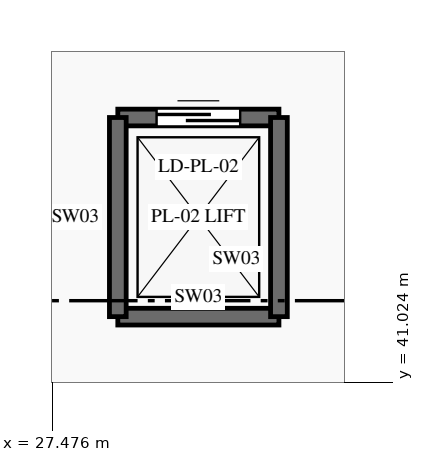
"""IFC4 building model, lengths in metres.
Left out: names, types, materials, properties, quantities, classifications, styles, units other than length and angle.
Written with IfcOpenShell. Run it as: python <this file> out.ifc"""

import sys

from ifc_helpers import new_model, si_unit, direction, frame, frame_2d, origin, place, context, subcontext, project, spatial, rectangle, extrude, element, fill, save


model = new_model("IFC4")
c1 = context("Model", 3, precision=1e-05, world=origin(), true_north=direction((0.0, 1.0)))
c2 = subcontext(c1, "Body", "Model", "MODEL_VIEW")
j1 = project(units=[si_unit("LENGTHUNIT", "METRE"), si_unit("PLANEANGLEUNIT", "RADIAN")], contexts=[c1])
p1 = place(None, origin())
s1 = spatial("IfcSite", under=j1, at=p1, CompositionType="ELEMENT")
p2 = place(p1, origin())
s2 = spatial("IfcBuilding", under=s1, at=p2, CompositionType="ELEMENT")
p3 = place(p2, origin())
s3 = spatial("IfcBuildingStorey", under=s2, at=p3, CompositionType="ELEMENT", Elevation=0.0)
p4 = place(p3, frame((28.34, 41.89, 0.0), z_axis=(0.0, 0.0, 1.0), x_axis=(1.0, 0.0, 0.0)))
e1 = element("IfcWall", 1, at=p4, inside=s3, PredefinedType="SHEAR", context=c2, shape_type="SweptSolid", body=[
    extrude(rectangle(XDim=2.12, YDim=0.22, at=frame_2d((1.06, 0.0))), origin(), (0.0, 0.0, 1.0), 6.0),
])
p5 = place(p3, frame((28.34, 44.51, 0.0), z_axis=(0.0, 0.0, 1.0), x_axis=(1.0, 0.0, 0.0)))
e2 = element("IfcWall", 2, at=p5, inside=s3, PredefinedType="SHEAR", context=c2, shape_type="SweptSolid", body=[
    extrude(rectangle(XDim=2.12, YDim=0.22, at=frame_2d((1.06, 0.0))), origin(), (0.0, 0.0, 1.0), 6.0),
])
p6 = place(p5, frame((0.51, 0.0, 0.0)))
e3 = element("IfcOpeningElement", 3, at=p6, cuts=e2, PredefinedType="OPENING", context=c2, shape_type="SweptSolid", body=[
    extrude(rectangle(XDim=1.1, YDim=2.15, at=frame_2d((0.55, 1.075))), frame((0.0, 0.125, 0.0), z_axis=(0.0, -1.0, 0.0), x_axis=(1.0, 0.0, 0.0)), (0.0, 0.0, 1.0), 0.25),
])
for number, where, z_axis, x_axis in (
    (4, (28.34, 41.89, 0.0), (0.0, 0.0, 1.0), (0.0, 1.0, 0.0)),
    (5, (30.46, 41.89, 0.0), (0.0, 0.0, 1.0), (0.0, 1.0, 0.0)),
):
    element("IfcWall", number, at=place(p3, frame(where, z_axis=z_axis, x_axis=x_axis)), inside=s3, PredefinedType="SHEAR", context=c2, shape_type="SweptSolid", body=[
        extrude(rectangle(XDim=2.62, YDim=0.22, at=frame_2d((1.31, 0.0))), origin(), (0.0, 0.0, 1.0), 6.0),
    ])
p7 = place(p6, origin())
e6 = element("IfcDoor", 6, at=p7, inside=s3, OperationType="SLIDING_TO_LEFT", PredefinedType="DOOR", context=c2, shape_type="SweptSolid", body=[
    extrude(rectangle(XDim=1.1, YDim=2.15, at=frame_2d((0.55, 1.075))), frame((0.0, 0.025, 0.0), z_axis=(0.0, -1.0, 0.0), x_axis=(1.0, 0.0, 0.0)), (0.0, 0.0, 1.0), 0.05),
])
fill(e3, e6)
save(model, sys.argv[1])
